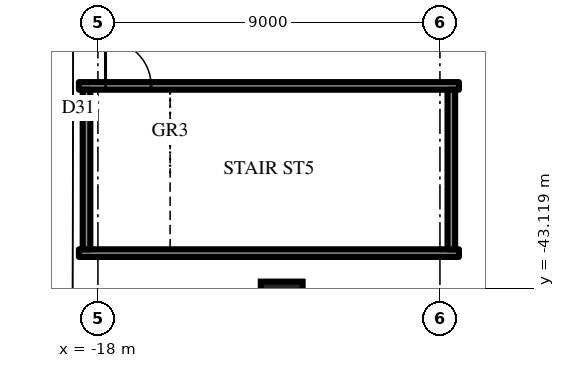
"""IFC4 building model, lengths in metres.
Left out: names, types, materials, properties, quantities, classifications, styles, units other than length and angle.
Written with IfcOpenShell. Run it as: python <this file> out.ifc"""

import sys

from ifc_helpers import new_model, si_unit, direction, frame, frame_2d, origin, origin_2d, place, context, subcontext, project, spatial, rectangle, extrude, element, fill, save


model = new_model("IFC4")
c1 = context("Model", 3, precision=1e-05, world=origin(), true_north=direction((0.0, 1.0)))
c2 = subcontext(c1, "Body", "Model", "MODEL_VIEW")
j1 = project(units=[si_unit("LENGTHUNIT", "METRE"), si_unit("PLANEANGLEUNIT", "RADIAN")], contexts=[c1])
p1 = place(None, origin())
s1 = spatial("IfcSite", under=j1, at=p1, CompositionType="ELEMENT")
p2 = place(p1, origin())
s2 = spatial("IfcBuilding", under=s1, at=p2, CompositionType="ELEMENT")
p3 = place(p2, frame((0.0, 0.0, 18.5)))
s3 = spatial("IfcBuildingStorey", under=s2, at=p3, CompositionType="ELEMENT", Elevation=18.5)
p4 = place(p3, frame((-18.5, -42.2, 0.0), z_axis=(0.0, 0.0, 1.0), x_axis=(1.0, 0.0, 0.0)))
e1 = element("IfcWall", 1, at=p4, inside=s3, PredefinedType="SHEAR", context=c2, shape_type="SweptSolid", body=[
    extrude(rectangle(XDim=10.0, YDim=0.2, at=frame_2d((5.0, 0.0))), origin(), (0.0, 0.0, 1.0), 5.0),
])
p5 = place(p3, frame((-8.5, -37.8, 0.0), z_axis=(0.0, 0.0, 1.0), x_axis=(-1.0, 0.0, 0.0)))
e2 = element("IfcWall", 2, at=p5, inside=s3, PredefinedType="SHEAR", context=c2, shape_type="SweptSolid", body=[
    extrude(rectangle(XDim=10.0, YDim=0.2, at=frame_2d((5.0, 0.0))), origin(), (0.0, 0.0, 1.0), 5.0),
])
p6 = place(p5, frame((8.1, 0.0, 0.0)))
e3 = element("IfcOpeningElement", 3, at=p6, cuts=e2, PredefinedType="OPENING", context=c2, shape_type="SweptSolid", body=[
    extrude(rectangle(XDim=1.2, YDim=2.2, at=frame_2d((0.6, 1.1))), frame((0.0, 0.11, 0.0), z_axis=(0.0, -1.0, 0.0), x_axis=(1.0, 0.0, 0.0)), (0.0, 0.0, 1.0), 0.22),
])
for number, where, z_axis, x_axis in (
    (4, (-18.3, -37.9, 0.0), (0.0, 0.0, 1.0), (0.0, -1.0, 0.0)),
    (5, (-8.7, -42.1, 0.0), (0.0, 0.0, 1.0), (0.0, 1.0, 0.0)),
):
    element("IfcWall", number, at=place(p3, frame(where, z_axis=z_axis, x_axis=x_axis)), inside=s3, PredefinedType="SHEAR", context=c2, shape_type="SweptSolid", body=[
        extrude(rectangle(XDim=4.2, YDim=0.2, at=frame_2d((2.1, 0.0))), origin(), (0.0, 0.0, 1.0), 5.0),
    ])
p7 = place(p3, frame((-13.164, -43.5, 0.0), z_axis=(0.0, 0.0, 1.0), x_axis=(1.0, 0.0, 0.0)))
e6 = element("IfcColumn", 6, at=p7, inside=s3, PredefinedType="COLUMN", context=c2, shape_type="SweptSolid", body=[
    extrude(rectangle(XDim=1.1, YDim=1.1, at=origin_2d()), origin(), (0.0, 0.0, 1.0), 5.0),
])
p8 = place(p6, frame((1.2, 0.0, 0.0), z_axis=(0.0, 0.0, 1.0), x_axis=(-1.0, 0.0, 0.0)))
e7 = element("IfcDoor", 7, at=p8, inside=s3, OperationType="SINGLE_SWING_RIGHT", PredefinedType="DOOR", context=c2, shape_type="SweptSolid", body=[
    extrude(rectangle(XDim=1.2, YDim=2.2, at=frame_2d((0.6, 1.1))), frame((0.0, 0.025, 0.0), z_axis=(0.0, -1.0, 0.0), x_axis=(1.0, 0.0, 0.0)), (0.0, 0.0, 1.0), 0.05),
])
fill(e3, e7)
save(model, sys.argv[1])
